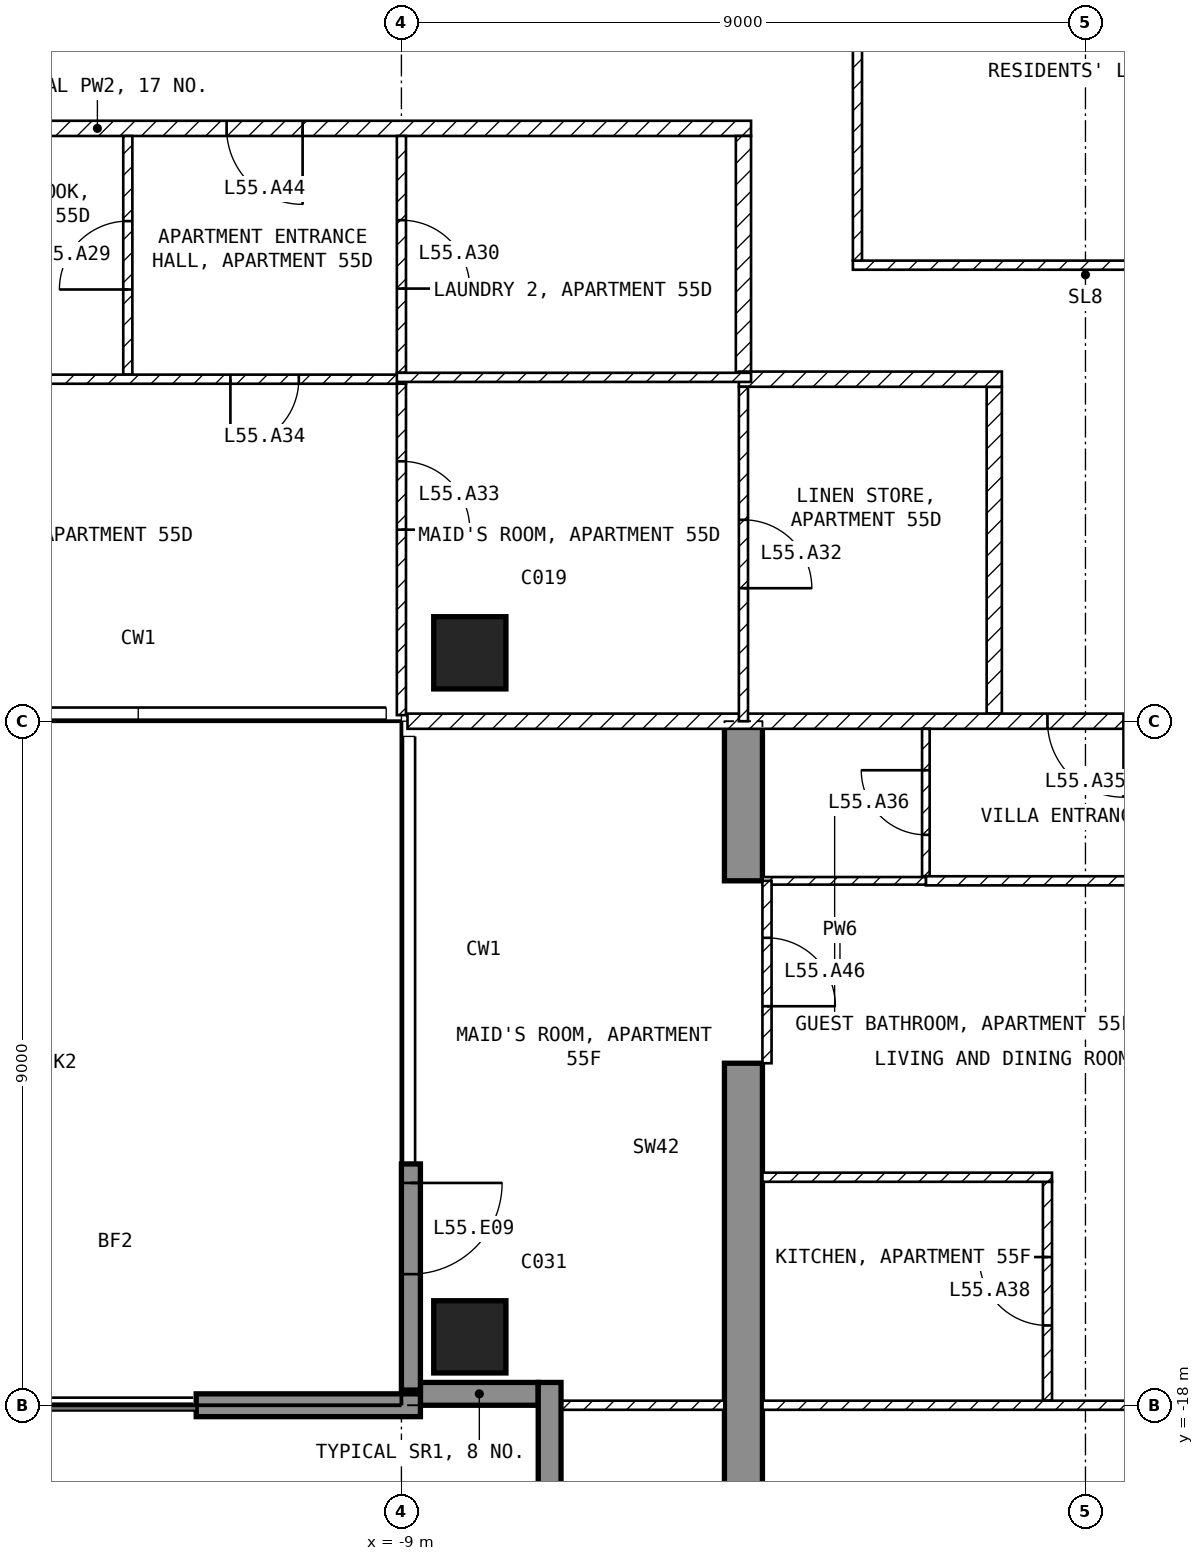
"""IFC4 building model, lengths in metres.
Left out: names, types, materials, properties, quantities, classifications, styles, units other than length and angle.
Written with IfcOpenShell. Run it as: python <this file> out.ifc"""

import sys

from ifc_helpers import new_model, si_unit, direction, frame, frame_2d, origin, origin_2d, place, context, subcontext, project, spatial, polyline, rectangle, outline, extrude, element, fill, save


model = new_model("IFC4")
c1 = context("Model", 3, precision=1e-05, world=origin(), true_north=direction((0.0, 1.0)))
c2 = subcontext(c1, "Body", "Model", "MODEL_VIEW")
j1 = project(units=[si_unit("LENGTHUNIT", "METRE"), si_unit("PLANEANGLEUNIT", "RADIAN")], contexts=[c1])
p1 = place(None, origin())
s1 = spatial("IfcSite", under=j1, at=p1, CompositionType="ELEMENT")
p2 = place(p1, origin())
s2 = spatial("IfcBuilding", under=s1, at=p2, CompositionType="ELEMENT")
p3 = place(p2, frame((0.0, 0.0, 219.1)))
s3 = spatial("IfcBuildingStorey", under=s2, at=p3, CompositionType="ELEMENT", Elevation=219.1)
for number, where, z_axis, x_axis in (
    (1, (-8.1, -17.1, -0.25), (0.0, 0.0, 1.0), (1.0, 0.0, 0.0)),
    (2, (-8.1, -8.1, -0.25), (0.0, 0.0, 1.0), (1.0, 0.0, 0.0)),
):
    element("IfcColumn", number, at=place(p3, frame(where, z_axis=z_axis, x_axis=x_axis)), inside=s3, PredefinedType="COLUMN", context=c2, shape_type="SweptSolid", body=[
        extrude(rectangle(XDim=0.95, YDim=0.95, at=origin_2d()), origin(), (0.0, 0.0, 1.0), 3.45),
    ])
p4 = place(p3, frame((-4.75, -20.225, -0.25), z_axis=(1.0, 0.0, 0.0), x_axis=(0.0, 1.0, 0.0)))
e3 = element("IfcWall", 3, at=p4, inside=s3, PredefinedType="SHEAR", context=c2, shape_type="SweptSolid", body=[
    extrude(outline(polyline([(0.0, 0.0), (6.725, 0.0), (6.725, 2.65), (9.125, 2.65), (9.125, 0.0), (11.225, 0.0), (11.225, 3.45), (0.0, 3.45), (0.0, 0.0)])), origin(), (0.0, 0.0, 1.0), 0.5),
])
p5 = place(p3, frame((-8.875, -14.825, 0.0), z_axis=(0.0, 0.0, 1.0), x_axis=(0.0, -1.0, 0.0)))
e4 = element("IfcWall", 4, at=p5, inside=s3, PredefinedType="SOLIDWALL", context=c2, shape_type="SweptSolid", body=[
    extrude(rectangle(XDim=2.975, YDim=0.25, at=frame_2d((1.488, 0.0))), origin(), (0.0, 0.0, 1.0), 3.2),
])
p6 = place(p5, frame((0.25, 0.0, 0.0)))
e5 = element("IfcOpeningElement", 5, at=p6, cuts=e4, PredefinedType="OPENING", context=c2, shape_type="SweptSolid", body=[
    extrude(rectangle(XDim=1.2, YDim=2.4, at=frame_2d((0.6, 1.2))), frame((0.0, 0.135, 0.0), z_axis=(0.0, -1.0, 0.0), x_axis=(1.0, 0.0, 0.0)), (0.0, 0.0, 1.0), 0.27),
])
p7 = place(p3, frame((-8.75, -17.85, 0.0), z_axis=(0.0, 0.0, 1.0), x_axis=(1.0, 0.0, 0.0)))
e6 = element("IfcWall", 6, at=p7, inside=s3, PredefinedType="SOLIDWALL", context=c2, shape_type="SweptSolid", body=[
    extrude(rectangle(XDim=1.55, YDim=0.3, at=frame_2d((0.775, 0.0))), origin(), (0.0, 0.0, 1.0), 3.2),
])
p8 = place(p3, frame((-7.05, -17.7, 0.0), z_axis=(0.0, 0.0, 1.0), x_axis=(0.0, -1.0, 0.0)))
e7 = element("IfcWall", 7, at=p8, inside=s3, PredefinedType="SOLIDWALL", context=c2, shape_type="SweptSolid", body=[
    extrude(rectangle(XDim=1.8, YDim=0.3, at=frame_2d((0.9, 0.0))), origin(), (0.0, 0.0, 1.0), 3.2),
])
p9 = place(p3, frame((-8.75, -18.0, 0.0), z_axis=(0.0, 0.0, 1.0), x_axis=(-1.0, 0.0, 0.0)))
e8 = element("IfcWall", 8, at=p9, inside=s3, PredefinedType="SOLIDWALL", context=c2, shape_type="SweptSolid", body=[
    extrude(rectangle(XDim=2.95, YDim=0.3, at=frame_2d((1.475, 0.0))), origin(), (0.0, 0.0, 1.0), 3.2),
])
p10 = place(p3, frame((-3.06, -3.0, 0.0), z_axis=(0.0, 0.0, 1.0), x_axis=(1.0, 0.0, 0.0)))
e9 = element("IfcWall", 9, at=p10, inside=s3, PredefinedType="PARTITIONING", context=c2, shape_type="SweptSolid", body=[
    extrude(rectangle(XDim=6.12, YDim=0.12, at=frame_2d((3.06, 0.0))), origin(), (0.0, 0.0, 1.0), 3.2),
])
p11 = place(p3, frame((-3.0, 2.94, 0.0), z_axis=(0.0, 0.0, 1.0), x_axis=(0.0, -1.0, 0.0)))
e10 = element("IfcWall", 10, at=p11, inside=s3, PredefinedType="PARTITIONING", context=c2, shape_type="SweptSolid", body=[
    extrude(rectangle(XDim=5.88, YDim=0.12, at=frame_2d((2.94, 0.0))), origin(), (0.0, 0.0, 1.0), 3.2),
])
p12 = place(p3, frame((-4.4, -1.2, 0.0), z_axis=(0.0, 0.0, 1.0), x_axis=(-1.0, 0.0, 0.0)))
e11 = element("IfcWall", 11, at=p12, inside=s3, PredefinedType="PARTITIONING", context=c2, shape_type="SweptSolid", body=[
    extrude(rectangle(XDim=17.2, YDim=0.2, at=frame_2d((8.6, 0.0))), origin(), (0.0, 0.0, 1.0), 3.2),
])
p13 = place(p12, frame((5.9, 0.0, 0.0)))
e12 = element("IfcOpeningElement", 12, at=p13, cuts=e11, PredefinedType="OPENING", context=c2, shape_type="SweptSolid", body=[
    extrude(rectangle(XDim=1.0, YDim=2.1, at=frame_2d((0.5, 1.05))), frame((0.0, 0.11, 0.0), z_axis=(0.0, -1.0, 0.0), x_axis=(1.0, 0.0, 0.0)), (0.0, 0.0, 1.0), 0.22),
])
p14 = place(p3, frame((-4.5, -4.416, 0.0), z_axis=(0.0, 0.0, 1.0), x_axis=(0.0, 1.0, 0.0)))
e13 = element("IfcWall", 13, at=p14, inside=s3, PredefinedType="PARTITIONING", context=c2, shape_type="SweptSolid", body=[
    extrude(rectangle(XDim=3.116, YDim=0.2, at=frame_2d((1.558, 0.0))), origin(), (0.0, 0.0, 1.0), 3.2),
])
p15 = place(p3, frame((-1.2, -8.9, 0.0), z_axis=(0.0, 0.0, 1.0), x_axis=(0.0, 1.0, 0.0)))
e14 = element("IfcWall", 14, at=p15, inside=s3, PredefinedType="PARTITIONING", context=c2, shape_type="SweptSolid", body=[
    extrude(rectangle(XDim=4.3, YDim=0.2, at=frame_2d((2.15, 0.0))), origin(), (0.0, 0.0, 1.0), 3.2),
])
p16 = place(p3, frame((-1.1, -4.5, 0.0), z_axis=(0.0, 0.0, 1.0), x_axis=(-1.0, 0.0, 0.0)))
e15 = element("IfcWall", 15, at=p16, inside=s3, PredefinedType="PARTITIONING", context=c2, shape_type="SweptSolid", body=[
    extrude(rectangle(XDim=3.46, YDim=0.2, at=frame_2d((1.73, 0.0))), origin(), (0.0, 0.0, 1.0), 3.2),
])
p17 = place(p3, frame((8.92, -9.0, 0.0), z_axis=(0.0, 0.0, 1.0), x_axis=(-1.0, 0.0, 0.0)))
e16 = element("IfcWall", 16, at=p17, inside=s3, PredefinedType="PARTITIONING", context=c2, shape_type="SweptSolid", body=[
    extrude(rectangle(XDim=17.84, YDim=0.2, at=frame_2d((8.92, 0.0))), origin(), (0.0, 0.0, 1.0), 3.2),
])
p18 = place(p17, frame((8.42, 0.0, 0.0)))
e17 = element("IfcOpeningElement", 17, at=p18, cuts=e16, PredefinedType="OPENING", context=c2, shape_type="SweptSolid", body=[
    extrude(rectangle(XDim=1.0, YDim=2.1, at=frame_2d((0.5, 1.05))), frame((0.0, 0.11, 0.0), z_axis=(0.0, -1.0, 0.0), x_axis=(1.0, 0.0, 0.0)), (0.0, 0.0, 1.0), 0.22),
])
p19 = place(p3, frame((-12.6, -4.44, 0.0), z_axis=(0.0, 0.0, 1.0), x_axis=(0.0, 1.0, 0.0)))
e18 = element("IfcWall", 18, at=p19, inside=s3, PredefinedType="PARTITIONING", context=c2, shape_type="SweptSolid", body=[
    extrude(rectangle(XDim=3.14, YDim=0.12, at=frame_2d((1.57, 0.0))), origin(), (0.0, 0.0, 1.0), 3.2),
])
p20 = place(p19, frame((1.12, 0.0, 0.0)))
e19 = element("IfcOpeningElement", 19, at=p20, cuts=e18, PredefinedType="OPENING", context=c2, shape_type="SweptSolid", body=[
    extrude(rectangle(XDim=0.9, YDim=2.1, at=frame_2d((0.45, 1.05))), frame((0.0, 0.07, 0.0), z_axis=(0.0, -1.0, 0.0), x_axis=(1.0, 0.0, 0.0)), (0.0, 0.0, 1.0), 0.14),
])
p21 = place(p3, frame((-8.94, -4.5, 0.0), z_axis=(0.0, 0.0, 1.0), x_axis=(-1.0, 0.0, 0.0)))
e20 = element("IfcWall", 20, at=p21, inside=s3, PredefinedType="PARTITIONING", context=c2, shape_type="SweptSolid", body=[
    extrude(rectangle(XDim=8.46, YDim=0.12, at=frame_2d((4.23, 0.0))), origin(), (0.0, 0.0, 1.0), 3.2),
])
p22 = place(p21, frame((7.11, 0.0, 0.0)))
e21 = element("IfcOpeningElement", 21, at=p22, cuts=e20, PredefinedType="OPENING", context=c2, shape_type="SweptSolid", body=[
    extrude(rectangle(XDim=0.9, YDim=2.1, at=frame_2d((0.45, 1.05))), frame((0.0, 0.07, 0.0), z_axis=(0.0, -1.0, 0.0), x_axis=(1.0, 0.0, 0.0)), (0.0, 0.0, 1.0), 0.14),
])
p23 = place(p21, frame((1.41, 0.0, 0.0)))
e22 = element("IfcOpeningElement", 22, at=p23, cuts=e20, PredefinedType="OPENING", context=c2, shape_type="SweptSolid", body=[
    extrude(rectangle(XDim=0.9, YDim=2.1, at=frame_2d((0.45, 1.05))), frame((0.0, 0.07, 0.0), z_axis=(0.0, -1.0, 0.0), x_axis=(1.0, 0.0, 0.0)), (0.0, 0.0, 1.0), 0.14),
])
p24 = place(p3, frame((-9.0, -1.3, 0.0), z_axis=(0.0, 0.0, 1.0), x_axis=(0.0, -1.0, 0.0)))
e23 = element("IfcWall", 23, at=p24, inside=s3, PredefinedType="PARTITIONING", context=c2, shape_type="SweptSolid", body=[
    extrude(rectangle(XDim=3.116, YDim=0.12, at=frame_2d((1.558, 0.0))), origin(), (0.0, 0.0, 1.0), 3.2),
])
p25 = place(p24, frame((1.108, 0.0, 0.0)))
e24 = element("IfcOpeningElement", 24, at=p25, cuts=e23, PredefinedType="OPENING", context=c2, shape_type="SweptSolid", body=[
    extrude(rectangle(XDim=0.9, YDim=2.1, at=frame_2d((0.45, 1.05))), frame((0.0, 0.07, 0.0), z_axis=(0.0, -1.0, 0.0), x_axis=(1.0, 0.0, 0.0)), (0.0, 0.0, 1.0), 0.14),
])
p26 = place(p3, frame((-9.0, -4.56, 0.0), z_axis=(0.0, 0.0, 1.0), x_axis=(0.0, -1.0, 0.0)))
e25 = element("IfcWall", 25, at=p26, inside=s3, PredefinedType="PARTITIONING", context=c2, shape_type="SweptSolid", body=[
    extrude(rectangle(XDim=4.36, YDim=0.12, at=frame_2d((2.18, 0.0))), origin(), (0.0, 0.0, 1.0), 3.2),
])
p27 = place(p26, frame((1.02, 0.0, 0.0)))
e26 = element("IfcOpeningElement", 26, at=p27, cuts=e25, PredefinedType="OPENING", context=c2, shape_type="SweptSolid", body=[
    extrude(rectangle(XDim=0.9, YDim=2.1, at=frame_2d((0.45, 1.05))), frame((0.0, 0.07, 0.0), z_axis=(0.0, -1.0, 0.0), x_axis=(1.0, 0.0, 0.0)), (0.0, 0.0, 1.0), 0.14),
])
p28 = place(p3, frame((-4.4, -4.476, 0.0), z_axis=(0.0, 0.0, 1.0), x_axis=(-1.0, 0.0, 0.0)))
e27 = element("IfcWall", 27, at=p28, inside=s3, PredefinedType="PARTITIONING", context=c2, shape_type="SweptSolid", body=[
    extrude(rectangle(XDim=4.66, YDim=0.12, at=frame_2d((2.33, 0.0))), origin(), (0.0, 0.0, 1.0), 3.2),
])
p29 = place(p3, frame((-4.5, -4.6, 0.0), z_axis=(0.0, 0.0, 1.0), x_axis=(0.0, -1.0, 0.0)))
e28 = element("IfcWall", 28, at=p29, inside=s3, PredefinedType="PARTITIONING", context=c2, shape_type="SweptSolid", body=[
    extrude(rectangle(XDim=4.4, YDim=0.12, at=frame_2d((2.2, 0.0))), origin(), (0.0, 0.0, 1.0), 3.2),
])
p30 = place(p29, frame((1.75, 0.0, 0.0)))
e29 = element("IfcOpeningElement", 29, at=p30, cuts=e28, PredefinedType="OPENING", context=c2, shape_type="SweptSolid", body=[
    extrude(rectangle(XDim=0.9, YDim=2.1, at=frame_2d((0.45, 1.05))), frame((0.0, 0.07, 0.0), z_axis=(0.0, -1.0, 0.0), x_axis=(1.0, 0.0, 0.0)), (0.0, 0.0, 1.0), 0.14),
])
p31 = place(p3, frame((-2.1, -11.04, 0.0), z_axis=(0.0, 0.0, 1.0), x_axis=(0.0, 1.0, 0.0)))
e30 = element("IfcWall", 30, at=p31, inside=s3, PredefinedType="PARTITIONING", context=c2, shape_type="SweptSolid", body=[
    extrude(rectangle(XDim=1.94, YDim=0.1, at=frame_2d((0.97, 0.0))), origin(), (0.0, 0.0, 1.0), 3.2),
])
p32 = place(p31, frame((0.545, 0.0, 0.0)))
e31 = element("IfcOpeningElement", 31, at=p32, cuts=e30, PredefinedType="OPENING", context=c2, shape_type="SweptSolid", body=[
    extrude(rectangle(XDim=0.85, YDim=2.1, at=frame_2d((0.425, 1.05))), frame((0.0, 0.06, 0.0), z_axis=(0.0, -1.0, 0.0), x_axis=(1.0, 0.0, 0.0)), (0.0, 0.0, 1.0), 0.12),
])
p33 = place(p3, frame((4.25, -11.1, 0.0), z_axis=(0.0, 0.0, 1.0), x_axis=(-1.0, 0.0, 0.0)))
e32 = element("IfcWall", 32, at=p33, inside=s3, PredefinedType="PARTITIONING", context=c2, shape_type="SweptSolid", body=[
    extrude(rectangle(XDim=6.35, YDim=0.12, at=frame_2d((3.175, 0.0))), origin(), (0.0, 0.0, 1.0), 3.2),
])
p34 = place(p33, frame((2.725, 0.0, 0.0)))
e33 = element("IfcOpeningElement", 33, at=p34, cuts=e32, PredefinedType="OPENING", context=c2, shape_type="SweptSolid", body=[
    extrude(rectangle(XDim=0.9, YDim=2.1, at=frame_2d((0.45, 1.05))), frame((0.0, 0.07, 0.0), z_axis=(0.0, -1.0, 0.0), x_axis=(1.0, 0.0, 0.0)), (0.0, 0.0, 1.0), 0.14),
])
p35 = place(p3, frame((-2.1, -11.1, 0.0), z_axis=(0.0, 0.0, 1.0), x_axis=(-1.0, 0.0, 0.0)))
e34 = element("IfcWall", 34, at=p35, inside=s3, PredefinedType="PARTITIONING", context=c2, shape_type="SweptSolid", body=[
    extrude(rectangle(XDim=2.15, YDim=0.1, at=frame_2d((1.075, 0.0))), origin(), (0.0, 0.0, 1.0), 3.2),
])
p36 = place(p3, frame((-0.5, -17.94, 0.0), z_axis=(0.0, 0.0, 1.0), x_axis=(0.0, 1.0, 0.0)))
e35 = element("IfcWall", 35, at=p36, inside=s3, PredefinedType="PARTITIONING", context=c2, shape_type="SweptSolid", body=[
    extrude(rectangle(XDim=2.88, YDim=0.12, at=frame_2d((1.44, 0.0))), origin(), (0.0, 0.0, 1.0), 3.2),
])
p37 = place(p36, frame((0.99, 0.0, 0.0)))
e36 = element("IfcOpeningElement", 36, at=p37, cuts=e35, PredefinedType="OPENING", context=c2, shape_type="SweptSolid", body=[
    extrude(rectangle(XDim=0.9, YDim=2.1, at=frame_2d((0.45, 1.05))), frame((0.0, 0.07, 0.0), z_axis=(0.0, -1.0, 0.0), x_axis=(1.0, 0.0, 0.0)), (0.0, 0.0, 1.0), 0.14),
])
p38 = place(p3, frame((-0.44, -15.0, 0.0), z_axis=(0.0, 0.0, 1.0), x_axis=(-1.0, 0.0, 0.0)))
e37 = element("IfcWall", 37, at=p38, inside=s3, PredefinedType="PARTITIONING", context=c2, shape_type="SweptSolid", body=[
    extrude(rectangle(XDim=3.81, YDim=0.12, at=frame_2d((1.905, 0.0))), origin(), (0.0, 0.0, 1.0), 3.2),
])
p39 = place(p3, frame((4.25, -18.0, 0.0), z_axis=(0.0, 0.0, 1.0), x_axis=(-1.0, 0.0, 0.0)))
e38 = element("IfcWall", 38, at=p39, inside=s3, PredefinedType="PARTITIONING", context=c2, shape_type="SweptSolid", body=[
    extrude(rectangle(XDim=8.5, YDim=0.12, at=frame_2d((4.25, 0.0))), origin(), (0.0, 0.0, 1.0), 3.2),
])
p40 = place(p39, frame((1.925, 0.0, 0.0)))
e39 = element("IfcOpeningElement", 39, at=p40, cuts=e38, PredefinedType="OPENING", context=c2, shape_type="SweptSolid", body=[
    extrude(rectangle(XDim=0.9, YDim=2.1, at=frame_2d((0.45, 1.05))), frame((0.0, 0.07, 0.0), z_axis=(0.0, -1.0, 0.0), x_axis=(1.0, 0.0, 0.0)), (0.0, 0.0, 1.0), 0.14),
])
p41 = place(p3, frame((-4.75, -18.0, 0.0), z_axis=(0.0, 0.0, 1.0), x_axis=(-1.0, 0.0, 0.0)))
e40 = element("IfcWall", 40, at=p41, inside=s3, PredefinedType="PARTITIONING", context=c2, shape_type="SweptSolid", body=[
    extrude(rectangle(XDim=2.37, YDim=0.12, at=frame_2d((1.185, 0.0))), origin(), (0.0, 0.0, 1.0), 3.2),
])
p42 = place(p3, frame((-4.19, -11.1, 0.0), z_axis=(0.0, 0.0, 1.0), x_axis=(0.0, -1.0, 0.0)))
e41 = element("IfcWall", 41, at=p42, inside=s3, PredefinedType="PARTITIONING", context=c2, shape_type="SweptSolid", body=[
    extrude(rectangle(XDim=2.4, YDim=0.12, at=frame_2d((1.2, 0.0))), origin(), (0.0, 0.0, 1.0), 2.4),
])
p43 = place(p42, frame((0.75, 0.0, 0.0)))
e42 = element("IfcOpeningElement", 42, at=p43, cuts=e41, PredefinedType="OPENING", context=c2, shape_type="SweptSolid", body=[
    extrude(rectangle(XDim=0.9, YDim=2.1, at=frame_2d((0.45, 1.05))), frame((0.0, 0.07, 0.0), z_axis=(0.0, -1.0, 0.0), x_axis=(1.0, 0.0, 0.0)), (0.0, 0.0, 1.0), 0.14),
])
p44 = place(p6, origin())
e43 = element("IfcDoor", 43, at=p44, inside=s3, OperationType="SINGLE_SWING_LEFT", PredefinedType="DOOR", context=c2, shape_type="SweptSolid", body=[
    extrude(rectangle(XDim=1.2, YDim=2.4, at=frame_2d((0.6, 1.2))), frame((0.0, 0.025, 0.0), z_axis=(0.0, -1.0, 0.0), x_axis=(1.0, 0.0, 0.0)), (0.0, 0.0, 1.0), 0.05),
])
fill(e5, e43)
p45 = place(p20, origin())
e44 = element("IfcDoor", 44, at=p45, inside=s3, OperationType="SINGLE_SWING_LEFT", PredefinedType="DOOR", context=c2, shape_type="SweptSolid", body=[
    extrude(rectangle(XDim=0.9, YDim=2.1, at=frame_2d((0.45, 1.05))), frame((0.0, 0.025, 0.0), z_axis=(0.0, -1.0, 0.0), x_axis=(1.0, 0.0, 0.0)), (0.0, 0.0, 1.0), 0.05),
])
fill(e19, e44)
p46 = place(p25, origin())
e45 = element("IfcDoor", 45, at=p46, inside=s3, OperationType="SINGLE_SWING_RIGHT", PredefinedType="DOOR", context=c2, shape_type="SweptSolid", body=[
    extrude(rectangle(XDim=0.9, YDim=2.1, at=frame_2d((0.45, 1.05))), frame((0.0, 0.025, 0.0), z_axis=(0.0, -1.0, 0.0), x_axis=(1.0, 0.0, 0.0)), (0.0, 0.0, 1.0), 0.05),
])
fill(e24, e45)
p47 = place(p30, origin())
e46 = element("IfcDoor", 46, at=p47, inside=s3, OperationType="SINGLE_SWING_RIGHT", PredefinedType="DOOR", context=c2, shape_type="SweptSolid", body=[
    extrude(rectangle(XDim=0.9, YDim=2.1, at=frame_2d((0.45, 1.05))), frame((0.0, 0.025, 0.0), z_axis=(0.0, -1.0, 0.0), x_axis=(1.0, 0.0, 0.0)), (0.0, 0.0, 1.0), 0.05),
])
fill(e29, e46)
p48 = place(p27, origin())
e47 = element("IfcDoor", 47, at=p48, inside=s3, OperationType="SINGLE_SWING_RIGHT", PredefinedType="DOOR", context=c2, shape_type="SweptSolid", body=[
    extrude(rectangle(XDim=0.9, YDim=2.1, at=frame_2d((0.45, 1.05))), frame((0.0, 0.025, 0.0), z_axis=(0.0, -1.0, 0.0), x_axis=(1.0, 0.0, 0.0)), (0.0, 0.0, 1.0), 0.05),
])
fill(e26, e47)
p49 = place(p23, origin())
e48 = element("IfcDoor", 48, at=p49, inside=s3, OperationType="SINGLE_SWING_RIGHT", PredefinedType="DOOR", context=c2, shape_type="SweptSolid", body=[
    extrude(rectangle(XDim=0.9, YDim=2.1, at=frame_2d((0.45, 1.05))), frame((0.0, 0.025, 0.0), z_axis=(0.0, -1.0, 0.0), x_axis=(1.0, 0.0, 0.0)), (0.0, 0.0, 1.0), 0.05),
])
fill(e22, e48)
p50 = place(p18, origin())
e49 = element("IfcDoor", 49, at=p50, inside=s3, OperationType="SINGLE_SWING_LEFT", PredefinedType="DOOR", context=c2, shape_type="SweptSolid", body=[
    extrude(rectangle(XDim=1.0, YDim=2.1, at=frame_2d((0.5, 1.05))), frame((0.0, 0.025, 0.0), z_axis=(0.0, -1.0, 0.0), x_axis=(1.0, 0.0, 0.0)), (0.0, 0.0, 1.0), 0.05),
])
fill(e17, e49)
p51 = place(p32, origin())
e50 = element("IfcDoor", 50, at=p51, inside=s3, OperationType="SINGLE_SWING_RIGHT", PredefinedType="DOOR", context=c2, shape_type="SweptSolid", body=[
    extrude(rectangle(XDim=0.85, YDim=2.1, at=frame_2d((0.425, 1.05))), frame((0.0, 0.025, 0.0), z_axis=(0.0, -1.0, 0.0), x_axis=(1.0, 0.0, 0.0)), (0.0, 0.0, 1.0), 0.05),
])
fill(e31, e50)
p52 = place(p37, origin())
e51 = element("IfcDoor", 51, at=p52, inside=s3, OperationType="SINGLE_SWING_RIGHT", PredefinedType="DOOR", context=c2, shape_type="SweptSolid", body=[
    extrude(rectangle(XDim=0.9, YDim=2.1, at=frame_2d((0.45, 1.05))), frame((0.0, 0.025, 0.0), z_axis=(0.0, -1.0, 0.0), x_axis=(1.0, 0.0, 0.0)), (0.0, 0.0, 1.0), 0.05),
])
fill(e36, e51)
p53 = place(p13, origin())
e52 = element("IfcDoor", 52, at=p53, inside=s3, OperationType="SINGLE_SWING_LEFT", PredefinedType="DOOR", context=c2, shape_type="SweptSolid", body=[
    extrude(rectangle(XDim=1.0, YDim=2.1, at=frame_2d((0.5, 1.05))), frame((0.0, 0.025, 0.0), z_axis=(0.0, -1.0, 0.0), x_axis=(1.0, 0.0, 0.0)), (0.0, 0.0, 1.0), 0.05),
])
fill(e12, e52)
p54 = place(p43, origin())
e53 = element("IfcDoor", 53, at=p54, inside=s3, OperationType="SINGLE_SWING_RIGHT", PredefinedType="DOOR", context=c2, shape_type="SweptSolid", body=[
    extrude(rectangle(XDim=0.9, YDim=2.1, at=frame_2d((0.45, 1.05))), frame((0.0, 0.025, 0.0), z_axis=(0.0, -1.0, 0.0), x_axis=(1.0, 0.0, 0.0)), (0.0, 0.0, 1.0), 0.05),
])
fill(e42, e53)
save(model, sys.argv[1])
